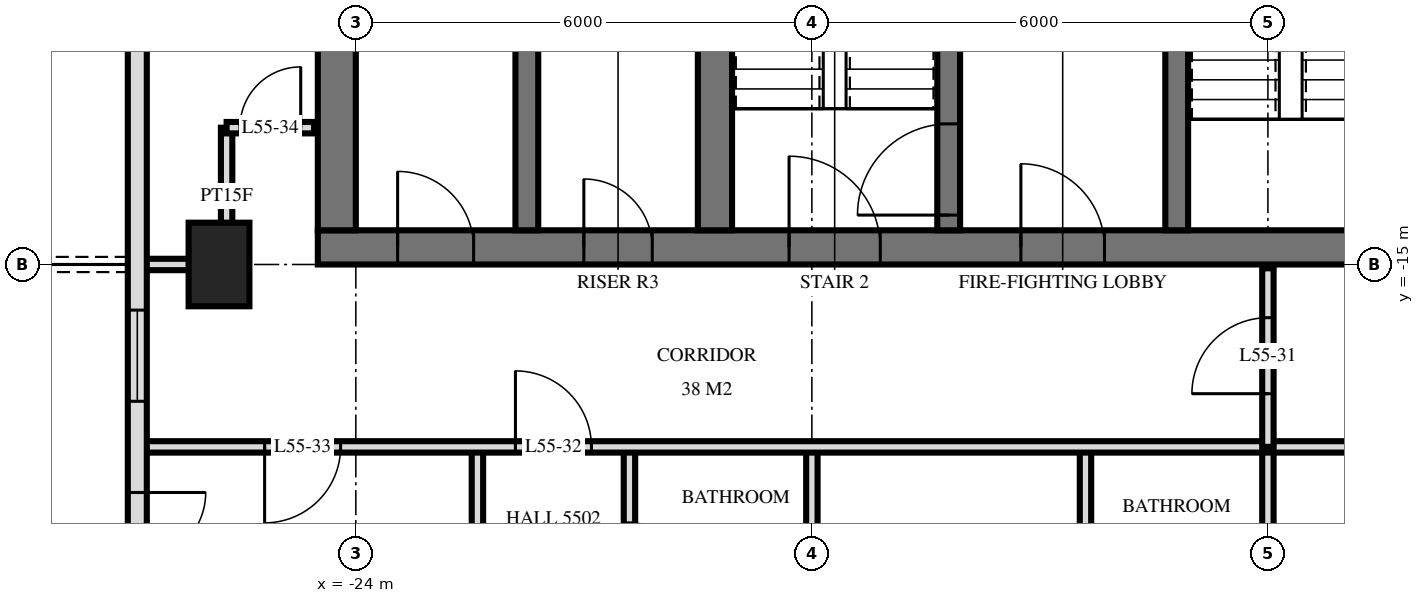
"""IFC4 building model, lengths in metres.
Left out: names, types, materials, properties, quantities, classifications, styles, units other than length and angle.
Written with IfcOpenShell. Run it as: python <this file> out.ifc"""

import sys

from ifc_helpers import new_model, si_unit, direction, frame, frame_2d, origin, origin_2d, place, context, subcontext, project, spatial, rectangle, extrude, element, fill, save


model = new_model("IFC4")
c1 = context("Model", 3, precision=1e-05, world=origin(), true_north=direction((0.0, 1.0)))
c2 = subcontext(c1, "Body", "Model", "MODEL_VIEW")
j1 = project(units=[si_unit("LENGTHUNIT", "METRE"), si_unit("PLANEANGLEUNIT", "RADIAN")], contexts=[c1])
p1 = place(None, origin())
s1 = spatial("IfcSite", under=j1, at=p1, CompositionType="ELEMENT")
p2 = place(p1, origin())
s2 = spatial("IfcBuilding", under=s1, at=p2, CompositionType="ELEMENT")
p3 = place(p2, frame((0.0, 0.0, 211.6)))
s3 = spatial("IfcBuildingStorey", under=s2, at=p3, CompositionType="ELEMENT", Elevation=211.6)
p4 = place(p3, frame((-25.8, -15.0, 0.0), z_axis=(0.0, 0.0, 1.0), x_axis=(0.0, 1.0, 0.0)))
e1 = element("IfcColumn", 1, at=p4, inside=s3, PredefinedType="COLUMN", context=c2, shape_type="SweptSolid", body=[
    extrude(rectangle(XDim=1.1, YDim=0.8, at=origin_2d()), origin(), (0.0, 0.0, 1.0), 3.5),
])
p5 = place(p3, frame((-24.5, -14.775, 0.0), z_axis=(0.0, 0.0, 1.0), x_axis=(1.0, 0.0, 0.0)))
e2 = element("IfcWall", 2, at=p5, inside=s3, PredefinedType="SHEAR", context=c2, shape_type="SweptSolid", body=[
    extrude(rectangle(XDim=14.5, YDim=0.45, at=frame_2d((7.25, 0.0))), origin(), (0.0, 0.0, 1.0), 3.5),
])
p6 = place(p5, frame((6.2, 0.0, 0.0)))
e3 = element("IfcOpeningElement", 3, at=p6, cuts=e2, PredefinedType="OPENING", context=c2, shape_type="SweptSolid", body=[
    extrude(rectangle(XDim=1.2, YDim=2.1, at=frame_2d((0.6, 1.05))), frame((0.0, 0.235, 0.0), z_axis=(0.0, -1.0, 0.0), x_axis=(1.0, 0.0, 0.0)), (0.0, 0.0, 1.0), 0.47),
])
p7 = place(p5, frame((9.25, 0.0, 0.0)))
e4 = element("IfcOpeningElement", 4, at=p7, cuts=e2, PredefinedType="OPENING", context=c2, shape_type="SweptSolid", body=[
    extrude(rectangle(XDim=1.1, YDim=2.1, at=frame_2d((0.55, 1.05))), frame((0.0, 0.235, 0.0), z_axis=(0.0, -1.0, 0.0), x_axis=(1.0, 0.0, 0.0)), (0.0, 0.0, 1.0), 0.47),
])
p8 = place(p5, frame((3.5, 0.0, 0.0)))
e5 = element("IfcOpeningElement", 5, at=p8, cuts=e2, PredefinedType="OPENING", context=c2, shape_type="SweptSolid", body=[
    extrude(rectangle(XDim=0.9, YDim=2.1, at=frame_2d((0.45, 1.05))), frame((0.0, 0.235, 0.0), z_axis=(0.0, -1.0, 0.0), x_axis=(1.0, 0.0, 0.0)), (0.0, 0.0, 1.0), 0.47),
])
p9 = place(p5, frame((1.05, 0.0, 0.0)))
e6 = element("IfcOpeningElement", 6, at=p9, cuts=e2, PredefinedType="OPENING", context=c2, shape_type="SweptSolid", body=[
    extrude(rectangle(XDim=1.0, YDim=2.1, at=frame_2d((0.5, 1.05))), frame((0.0, 0.235, 0.0), z_axis=(0.0, -1.0, 0.0), x_axis=(1.0, 0.0, 0.0)), (0.0, 0.0, 1.0), 0.47),
])
p10 = place(p3, frame((-24.25, -14.55, 0.0), z_axis=(0.0, 0.0, 1.0), x_axis=(0.0, 1.0, 0.0)))
e7 = element("IfcWall", 7, at=p10, inside=s3, PredefinedType="SHEAR", context=c2, shape_type="SweptSolid", body=[
    extrude(rectangle(XDim=14.1, YDim=0.5, at=frame_2d((7.05, 0.0))), origin(), (0.0, 0.0, 1.0), 3.5),
])
p11 = place(p3, frame((-13.2, -14.55, 0.0), z_axis=(0.0, 0.0, 1.0), x_axis=(0.0, 1.0, 0.0)))
e8 = element("IfcWall", 8, at=p11, inside=s3, PredefinedType="SHEAR", context=c2, shape_type="SweptSolid", body=[
    extrude(rectangle(XDim=5.4, YDim=0.3, at=frame_2d((2.7, 0.0))), origin(), (0.0, 0.0, 1.0), 3.5),
])
p12 = place(p11, frame((4.0, 0.0, 0.0)))
e9 = element("IfcOpeningElement", 9, at=p12, cuts=e8, PredefinedType="OPENING", context=c2, shape_type="SweptSolid", body=[
    extrude(rectangle(XDim=1.2, YDim=2.1, at=frame_2d((0.6, 1.05))), frame((0.0, 0.16, 0.0), z_axis=(0.0, -1.0, 0.0), x_axis=(1.0, 0.0, 0.0)), (0.0, 0.0, 1.0), 0.32),
])
p13 = place(p3, frame((-16.2, -14.55, 0.0), z_axis=(0.0, 0.0, 1.0), x_axis=(0.0, 1.0, 0.0)))
e10 = element("IfcWall", 10, at=p13, inside=s3, PredefinedType="SHEAR", context=c2, shape_type="SweptSolid", body=[
    extrude(rectangle(XDim=5.4, YDim=0.3, at=frame_2d((2.7, 0.0))), origin(), (0.0, 0.0, 1.0), 3.5),
])
p14 = place(p13, frame((0.2, 0.0, 0.0)))
e11 = element("IfcOpeningElement", 11, at=p14, cuts=e10, PredefinedType="OPENING", context=c2, shape_type="SweptSolid", body=[
    extrude(rectangle(XDim=1.2, YDim=2.1, at=frame_2d((0.6, 1.05))), frame((0.0, 0.16, 0.0), z_axis=(0.0, -1.0, 0.0), x_axis=(1.0, 0.0, 0.0)), (0.0, 0.0, 1.0), 0.32),
])
p15 = place(p3, frame((-19.275, -14.55, 0.0), z_axis=(0.0, 0.0, 1.0), x_axis=(0.0, 1.0, 0.0)))
e12 = element("IfcWall", 12, at=p15, inside=s3, PredefinedType="SHEAR", context=c2, shape_type="SweptSolid", body=[
    extrude(rectangle(XDim=5.4, YDim=0.45, at=frame_2d((2.7, 0.0))), origin(), (0.0, 0.0, 1.0), 3.5),
])
p16 = place(p3, frame((-21.75, -14.55, 0.0), z_axis=(0.0, 0.0, 1.0), x_axis=(0.0, 1.0, 0.0)))
e13 = element("IfcWall", 13, at=p16, inside=s3, PredefinedType="SHEAR", context=c2, shape_type="SweptSolid", body=[
    extrude(rectangle(XDim=5.4, YDim=0.3, at=frame_2d((2.7, 0.0))), origin(), (0.0, 0.0, 1.0), 3.5),
])
p17 = place(p3, frame((-26.875, -3.325, 0.0), z_axis=(0.0, 0.0, 1.0), x_axis=(0.0, -1.0, 0.0)))
e14 = element("IfcWall", 14, at=p17, inside=s3, PredefinedType="SOLIDWALL", context=c2, shape_type="SweptSolid", body=[
    extrude(rectangle(XDim=21.551, YDim=0.25, at=frame_2d((10.775, 0.0))), origin(), (0.0, 0.0, 1.0), 3.22),
])
p18 = place(p17, frame((6.65, 0.0, 0.0)))
e15 = element("IfcOpeningElement", 15, at=p18, cuts=e14, PredefinedType="OPENING", context=c2, shape_type="SweptSolid", body=[
    extrude(rectangle(XDim=1.8, YDim=2.4, at=frame_2d((0.9, 1.2))), frame((0.0, 0.135, 0.0), z_axis=(0.0, -1.0, 0.0), x_axis=(1.0, 0.0, 0.0)), (0.0, 0.0, 1.0), 0.27),
])
p19 = place(p17, frame((12.275, 0.0, 0.9)))
e16 = element("IfcOpeningElement", 16, at=p19, cuts=e14, PredefinedType="OPENING", context=c2, shape_type="SweptSolid", body=[
    extrude(rectangle(XDim=1.2, YDim=1.5, at=frame_2d((0.6, 0.75))), frame((0.0, 0.135, 0.0), z_axis=(0.0, -1.0, 0.0), x_axis=(1.0, 0.0, 0.0)), (0.0, 0.0, 1.0), 0.27),
])
p20 = place(p17, frame((14.675, 0.0, 0.0)))
e17 = element("IfcOpeningElement", 17, at=p20, cuts=e14, PredefinedType="OPENING", context=c2, shape_type="SweptSolid", body=[
    extrude(rectangle(XDim=1.8, YDim=2.4, at=frame_2d((0.9, 1.2))), frame((0.0, 0.135, 0.0), z_axis=(0.0, -1.0, 0.0), x_axis=(1.0, 0.0, 0.0)), (0.0, 0.0, 1.0), 0.27),
])
p21 = place(p17, frame((18.875, 0.0, 0.0)))
e18 = element("IfcOpeningElement", 18, at=p21, cuts=e14, PredefinedType="OPENING", context=c2, shape_type="SweptSolid", body=[
    extrude(rectangle(XDim=1.8, YDim=2.4, at=frame_2d((0.9, 1.2))), frame((0.0, 0.135, 0.0), z_axis=(0.0, -1.0, 0.0), x_axis=(1.0, 0.0, 0.0)), (0.0, 0.0, 1.0), 0.27),
])
p22 = place(p3, frame((-12.0, -17.4, 0.0), z_axis=(0.0, 0.0, 1.0), x_axis=(0.0, 1.0, 0.0)))
e19 = element("IfcWall", 19, at=p22, inside=s3, PredefinedType="PARTITIONING", context=c2, shape_type="SweptSolid", body=[
    extrude(rectangle(XDim=2.35, YDim=0.15, at=frame_2d((1.175, 0.0))), origin(), (0.0, 0.0, 1.0), 3.22),
])
p23 = place(p22, frame((0.7, 0.0, 0.0)))
e20 = element("IfcOpeningElement", 20, at=p23, cuts=e19, PredefinedType="OPENING", context=c2, shape_type="SweptSolid", body=[
    extrude(rectangle(XDim=1.0, YDim=2.1, at=frame_2d((0.5, 1.05))), frame((0.0, 0.085, 0.0), z_axis=(0.0, -1.0, 0.0), x_axis=(1.0, 0.0, 0.0)), (0.0, 0.0, 1.0), 0.17),
])
p24 = place(p3, frame((-12.0, -29.22, 0.0), z_axis=(0.0, 0.0, 1.0), x_axis=(0.0, 1.0, 0.0)))
e21 = element("IfcWall", 21, at=p24, inside=s3, PredefinedType="PARTITIONING", context=c2, shape_type="SweptSolid", body=[
    extrude(rectangle(XDim=11.82, YDim=0.15, at=frame_2d((5.91, 0.0))), origin(), (0.0, 0.0, 1.0), 3.22),
])
for number, where, z_axis, x_axis in (
    (22, (-14.4, -20.4, 0.0), (0.0, 0.0, 1.0), (0.0, 1.0, 0.0)),
    (23, (-18.0, -20.4, 0.0), (0.0, 0.0, 1.0), (0.0, 1.0, 0.0)),
):
    element("IfcWall", number, at=place(p3, frame(where, z_axis=z_axis, x_axis=x_axis)), inside=s3, PredefinedType="PARTITIONING", context=c2, shape_type="SweptSolid", body=[
        extrude(rectangle(XDim=3.0, YDim=0.15, at=frame_2d((1.5, 0.0))), origin(), (0.0, 0.0, 1.0), 3.22),
    ])
p25 = place(p3, frame((-20.4, -20.4, 0.0), z_axis=(0.0, 0.0, 1.0), x_axis=(0.0, 1.0, 0.0)))
e24 = element("IfcWall", 24, at=p25, inside=s3, PredefinedType="PARTITIONING", context=c2, shape_type="SweptSolid", body=[
    extrude(rectangle(XDim=3.0, YDim=0.15, at=frame_2d((1.5, 0.0))), origin(), (0.0, 0.0, 1.0), 3.22),
])
p26 = place(p25, frame((1.0, 0.0, 0.0)))
e25 = element("IfcOpeningElement", 25, at=p26, cuts=e24, PredefinedType="OPENING", context=c2, shape_type="SweptSolid", body=[
    extrude(rectangle(XDim=1.0, YDim=2.1, at=frame_2d((0.5, 1.05))), frame((0.0, 0.085, 0.0), z_axis=(0.0, -1.0, 0.0), x_axis=(1.0, 0.0, 0.0)), (0.0, 0.0, 1.0), 0.17),
])
p27 = place(p3, frame((-22.4, -20.4, 0.0), z_axis=(0.0, 0.0, 1.0), x_axis=(0.0, 1.0, 0.0)))
e26 = element("IfcWall", 26, at=p27, inside=s3, PredefinedType="PARTITIONING", context=c2, shape_type="SweptSolid", body=[
    extrude(rectangle(XDim=3.0, YDim=0.15, at=frame_2d((1.5, 0.0))), origin(), (0.0, 0.0, 1.0), 3.22),
])
p28 = place(p3, frame((-25.7, -15.0, 0.0), z_axis=(0.0, 0.0, 1.0), x_axis=(0.0, 1.0, 0.0)))
e27 = element("IfcWall", 27, at=p28, inside=s3, PredefinedType="PARTITIONING", context=c2, shape_type="SweptSolid", body=[
    extrude(rectangle(XDim=1.8, YDim=0.15, at=frame_2d((0.9, 0.0))), origin(), (0.0, 0.0, 1.0), 3.22),
])
p29 = place(p3, frame((-26.82, -17.4, 0.0), z_axis=(0.0, 0.0, 1.0), x_axis=(1.0, 0.0, 0.0)))
e28 = element("IfcWall", 28, at=p29, inside=s3, PredefinedType="PARTITIONING", context=c2, shape_type="SweptSolid", body=[
    extrude(rectangle(XDim=53.64, YDim=0.15, at=frame_2d((26.82, 0.0))), origin(), (0.0, 0.0, 1.0), 3.22),
])
p30 = place(p29, frame((4.92, 0.0, 0.0)))
e29 = element("IfcOpeningElement", 29, at=p30, cuts=e28, PredefinedType="OPENING", context=c2, shape_type="SweptSolid", body=[
    extrude(rectangle(XDim=1.0, YDim=2.1, at=frame_2d((0.5, 1.05))), frame((0.0, 0.085, 0.0), z_axis=(0.0, -1.0, 0.0), x_axis=(1.0, 0.0, 0.0)), (0.0, 0.0, 1.0), 0.17),
])
p31 = place(p29, frame((1.62, 0.0, 0.0)))
e30 = element("IfcOpeningElement", 30, at=p31, cuts=e28, PredefinedType="OPENING", context=c2, shape_type="SweptSolid", body=[
    extrude(rectangle(XDim=1.0, YDim=2.1, at=frame_2d((0.5, 1.05))), frame((0.0, 0.085, 0.0), z_axis=(0.0, -1.0, 0.0), x_axis=(1.0, 0.0, 0.0)), (0.0, 0.0, 1.0), 0.17),
])
p32 = place(p29, frame((41.17, 0.0, 0.0)))
e31 = element("IfcOpeningElement", 31, at=p32, cuts=e28, PredefinedType="OPENING", context=c2, shape_type="SweptSolid", body=[
    extrude(rectangle(XDim=1.0, YDim=2.1, at=frame_2d((0.5, 1.05))), frame((0.0, 0.085, 0.0), z_axis=(0.0, -1.0, 0.0), x_axis=(1.0, 0.0, 0.0)), (0.0, 0.0, 1.0), 0.17),
])
p33 = place(p29, frame((49.42, 0.0, 0.0)))
e32 = element("IfcOpeningElement", 32, at=p33, cuts=e28, PredefinedType="OPENING", context=c2, shape_type="SweptSolid", body=[
    extrude(rectangle(XDim=1.0, YDim=2.1, at=frame_2d((0.5, 1.05))), frame((0.0, 0.085, 0.0), z_axis=(0.0, -1.0, 0.0), x_axis=(1.0, 0.0, 0.0)), (0.0, 0.0, 1.0), 0.17),
])
p34 = place(p29, frame((47.62, 0.0, 0.0)))
e33 = element("IfcOpeningElement", 33, at=p34, cuts=e28, PredefinedType="OPENING", context=c2, shape_type="SweptSolid", body=[
    extrude(rectangle(XDim=1.0, YDim=2.1, at=frame_2d((0.5, 1.05))), frame((0.0, 0.085, 0.0), z_axis=(0.0, -1.0, 0.0), x_axis=(1.0, 0.0, 0.0)), (0.0, 0.0, 1.0), 0.17),
])
p35 = place(p29, frame((21.82, 0.0, 0.0)))
e34 = element("IfcOpeningElement", 34, at=p35, cuts=e28, PredefinedType="OPENING", context=c2, shape_type="SweptSolid", body=[
    extrude(rectangle(XDim=1.0, YDim=2.1, at=frame_2d((0.5, 1.05))), frame((0.0, 0.085, 0.0), z_axis=(0.0, -1.0, 0.0), x_axis=(1.0, 0.0, 0.0)), (0.0, 0.0, 1.0), 0.17),
])
p36 = place(p29, frame((33.82, 0.0, 0.0)))
e35 = element("IfcOpeningElement", 35, at=p36, cuts=e28, PredefinedType="OPENING", context=c2, shape_type="SweptSolid", body=[
    extrude(rectangle(XDim=1.0, YDim=2.1, at=frame_2d((0.5, 1.05))), frame((0.0, 0.085, 0.0), z_axis=(0.0, -1.0, 0.0), x_axis=(1.0, 0.0, 0.0)), (0.0, 0.0, 1.0), 0.17),
])
p37 = place(p3, frame((-26.82, -15.0, 0.0), z_axis=(0.0, 0.0, 1.0), x_axis=(1.0, 0.0, 0.0)))
e36 = element("IfcWall", 36, at=p37, inside=s3, PredefinedType="PARTITIONING", context=c2, shape_type="SweptSolid", body=[
    extrude(rectangle(XDim=1.12, YDim=0.15, at=frame_2d((0.56, 0.0))), origin(), (0.0, 0.0, 1.0), 3.22),
])
p38 = place(p3, frame((-25.7, -13.2, 0.0), z_axis=(0.0, 0.0, 1.0), x_axis=(1.0, 0.0, 0.0)))
e37 = element("IfcWall", 37, at=p38, inside=s3, PredefinedType="PARTITIONING", context=c2, shape_type="SweptSolid", body=[
    extrude(rectangle(XDim=1.15, YDim=0.15, at=frame_2d((0.575, 0.0))), origin(), (0.0, 0.0, 1.0), 3.22),
])
p39 = place(p38, frame((0.175, 0.0, 0.0)))
e38 = element("IfcOpeningElement", 38, at=p39, cuts=e37, PredefinedType="OPENING", context=c2, shape_type="SweptSolid", body=[
    extrude(rectangle(XDim=0.8, YDim=2.1, at=frame_2d((0.4, 1.05))), frame((0.0, 0.085, 0.0), z_axis=(0.0, -1.0, 0.0), x_axis=(1.0, 0.0, 0.0)), (0.0, 0.0, 1.0), 0.17),
])
p40 = place(p19, origin())
e39 = element("IfcWindow", 39, at=p40, inside=s3, PartitioningType="SINGLE_PANEL", PredefinedType="WINDOW", context=c2, shape_type="SweptSolid", body=[
    extrude(rectangle(XDim=1.2, YDim=1.5, at=frame_2d((0.6, 0.75))), frame((0.0, 0.03, 0.0), z_axis=(0.0, -1.0, 0.0), x_axis=(1.0, 0.0, 0.0)), (0.0, 0.0, 1.0), 0.06),
])
fill(e16, e39)
p41 = place(p20, origin())
e40 = element("IfcDoor", 40, at=p41, inside=s3, OperationType="DOUBLE_DOOR_SINGLE_SWING", PredefinedType="DOOR", context=c2, shape_type="SweptSolid", body=[
    extrude(rectangle(XDim=1.8, YDim=2.4, at=frame_2d((0.9, 1.2))), frame((0.0, 0.025, 0.0), z_axis=(0.0, -1.0, 0.0), x_axis=(1.0, 0.0, 0.0)), (0.0, 0.0, 1.0), 0.05),
])
fill(e17, e40)
p42 = place(p6, origin())
e41 = element("IfcDoor", 41, at=p42, inside=s3, OperationType="SINGLE_SWING_RIGHT", PredefinedType="DOOR", context=c2, shape_type="SweptSolid", body=[
    extrude(rectangle(XDim=1.2, YDim=2.1, at=frame_2d((0.6, 1.05))), frame((0.0, 0.025, 0.0), z_axis=(0.0, -1.0, 0.0), x_axis=(1.0, 0.0, 0.0)), (0.0, 0.0, 1.0), 0.05),
])
fill(e3, e41)
p43 = place(p7, origin())
e42 = element("IfcDoor", 42, at=p43, inside=s3, OperationType="SINGLE_SWING_RIGHT", PredefinedType="DOOR", context=c2, shape_type="SweptSolid", body=[
    extrude(rectangle(XDim=1.1, YDim=2.1, at=frame_2d((0.55, 1.05))), frame((0.0, 0.025, 0.0), z_axis=(0.0, -1.0, 0.0), x_axis=(1.0, 0.0, 0.0)), (0.0, 0.0, 1.0), 0.05),
])
fill(e4, e42)
p44 = place(p8, origin())
e43 = element("IfcDoor", 43, at=p44, inside=s3, OperationType="SINGLE_SWING_RIGHT", PredefinedType="DOOR", context=c2, shape_type="SweptSolid", body=[
    extrude(rectangle(XDim=0.9, YDim=2.1, at=frame_2d((0.45, 1.05))), frame((0.0, 0.025, 0.0), z_axis=(0.0, -1.0, 0.0), x_axis=(1.0, 0.0, 0.0)), (0.0, 0.0, 1.0), 0.05),
])
fill(e5, e43)
p45 = place(p9, origin())
e44 = element("IfcDoor", 44, at=p45, inside=s3, OperationType="SINGLE_SWING_RIGHT", PredefinedType="DOOR", context=c2, shape_type="SweptSolid", body=[
    extrude(rectangle(XDim=1.0, YDim=2.1, at=frame_2d((0.5, 1.05))), frame((0.0, 0.025, 0.0), z_axis=(0.0, -1.0, 0.0), x_axis=(1.0, 0.0, 0.0)), (0.0, 0.0, 1.0), 0.05),
])
fill(e6, e44)
p46 = place(p14, origin())
e45 = element("IfcDoor", 45, at=p46, inside=s3, OperationType="SINGLE_SWING_RIGHT", PredefinedType="DOOR", context=c2, shape_type="SweptSolid", body=[
    extrude(rectangle(XDim=1.2, YDim=2.1, at=frame_2d((0.6, 1.05))), frame((0.0, 0.025, 0.0), z_axis=(0.0, -1.0, 0.0), x_axis=(1.0, 0.0, 0.0)), (0.0, 0.0, 1.0), 0.05),
])
fill(e11, e45)
p47 = place(p23, origin())
e46 = element("IfcDoor", 46, at=p47, inside=s3, OperationType="SINGLE_SWING_RIGHT", PredefinedType="DOOR", context=c2, shape_type="SweptSolid", body=[
    extrude(rectangle(XDim=1.0, YDim=2.1, at=frame_2d((0.5, 1.05))), frame((0.0, 0.025, 0.0), z_axis=(0.0, -1.0, 0.0), x_axis=(1.0, 0.0, 0.0)), (0.0, 0.0, 1.0), 0.05),
])
fill(e20, e46)
p48 = place(p30, origin())
e47 = element("IfcDoor", 47, at=p48, inside=s3, OperationType="SINGLE_SWING_RIGHT", PredefinedType="DOOR", context=c2, shape_type="SweptSolid", body=[
    extrude(rectangle(XDim=1.0, YDim=2.1, at=frame_2d((0.5, 1.05))), frame((0.0, 0.025, 0.0), z_axis=(0.0, -1.0, 0.0), x_axis=(1.0, 0.0, 0.0)), (0.0, 0.0, 1.0), 0.05),
])
fill(e29, e47)
p49 = place(p31, frame((0.5, 0.0, 0.0), z_axis=(0.0, 0.0, 1.0), x_axis=(-1.0, 0.0, 0.0)))
e48 = element("IfcDoor", 48, at=p49, inside=s3, OperationType="SINGLE_SWING_LEFT", PredefinedType="DOOR", context=c2, shape_type="SweptSolid", body=[
    extrude(rectangle(XDim=1.0, YDim=2.1, at=frame_2d((0.0, 1.05))), frame((0.0, -0.025, 0.0), z_axis=(0.0, 1.0, 0.0), x_axis=(-1.0, 0.0, 0.0)), (0.0, 0.0, 1.0), 0.05),
])
fill(e30, e48)
p50 = place(p39, origin())
e49 = element("IfcDoor", 49, at=p50, inside=s3, OperationType="SINGLE_SWING_LEFT", PredefinedType="DOOR", context=c2, shape_type="SweptSolid", body=[
    extrude(rectangle(XDim=0.8, YDim=2.1, at=frame_2d((0.4, 1.05))), frame((0.0, 0.025, 0.0), z_axis=(0.0, -1.0, 0.0), x_axis=(1.0, 0.0, 0.0)), (0.0, 0.0, 1.0), 0.05),
])
fill(e38, e49)
save(model, sys.argv[1])
